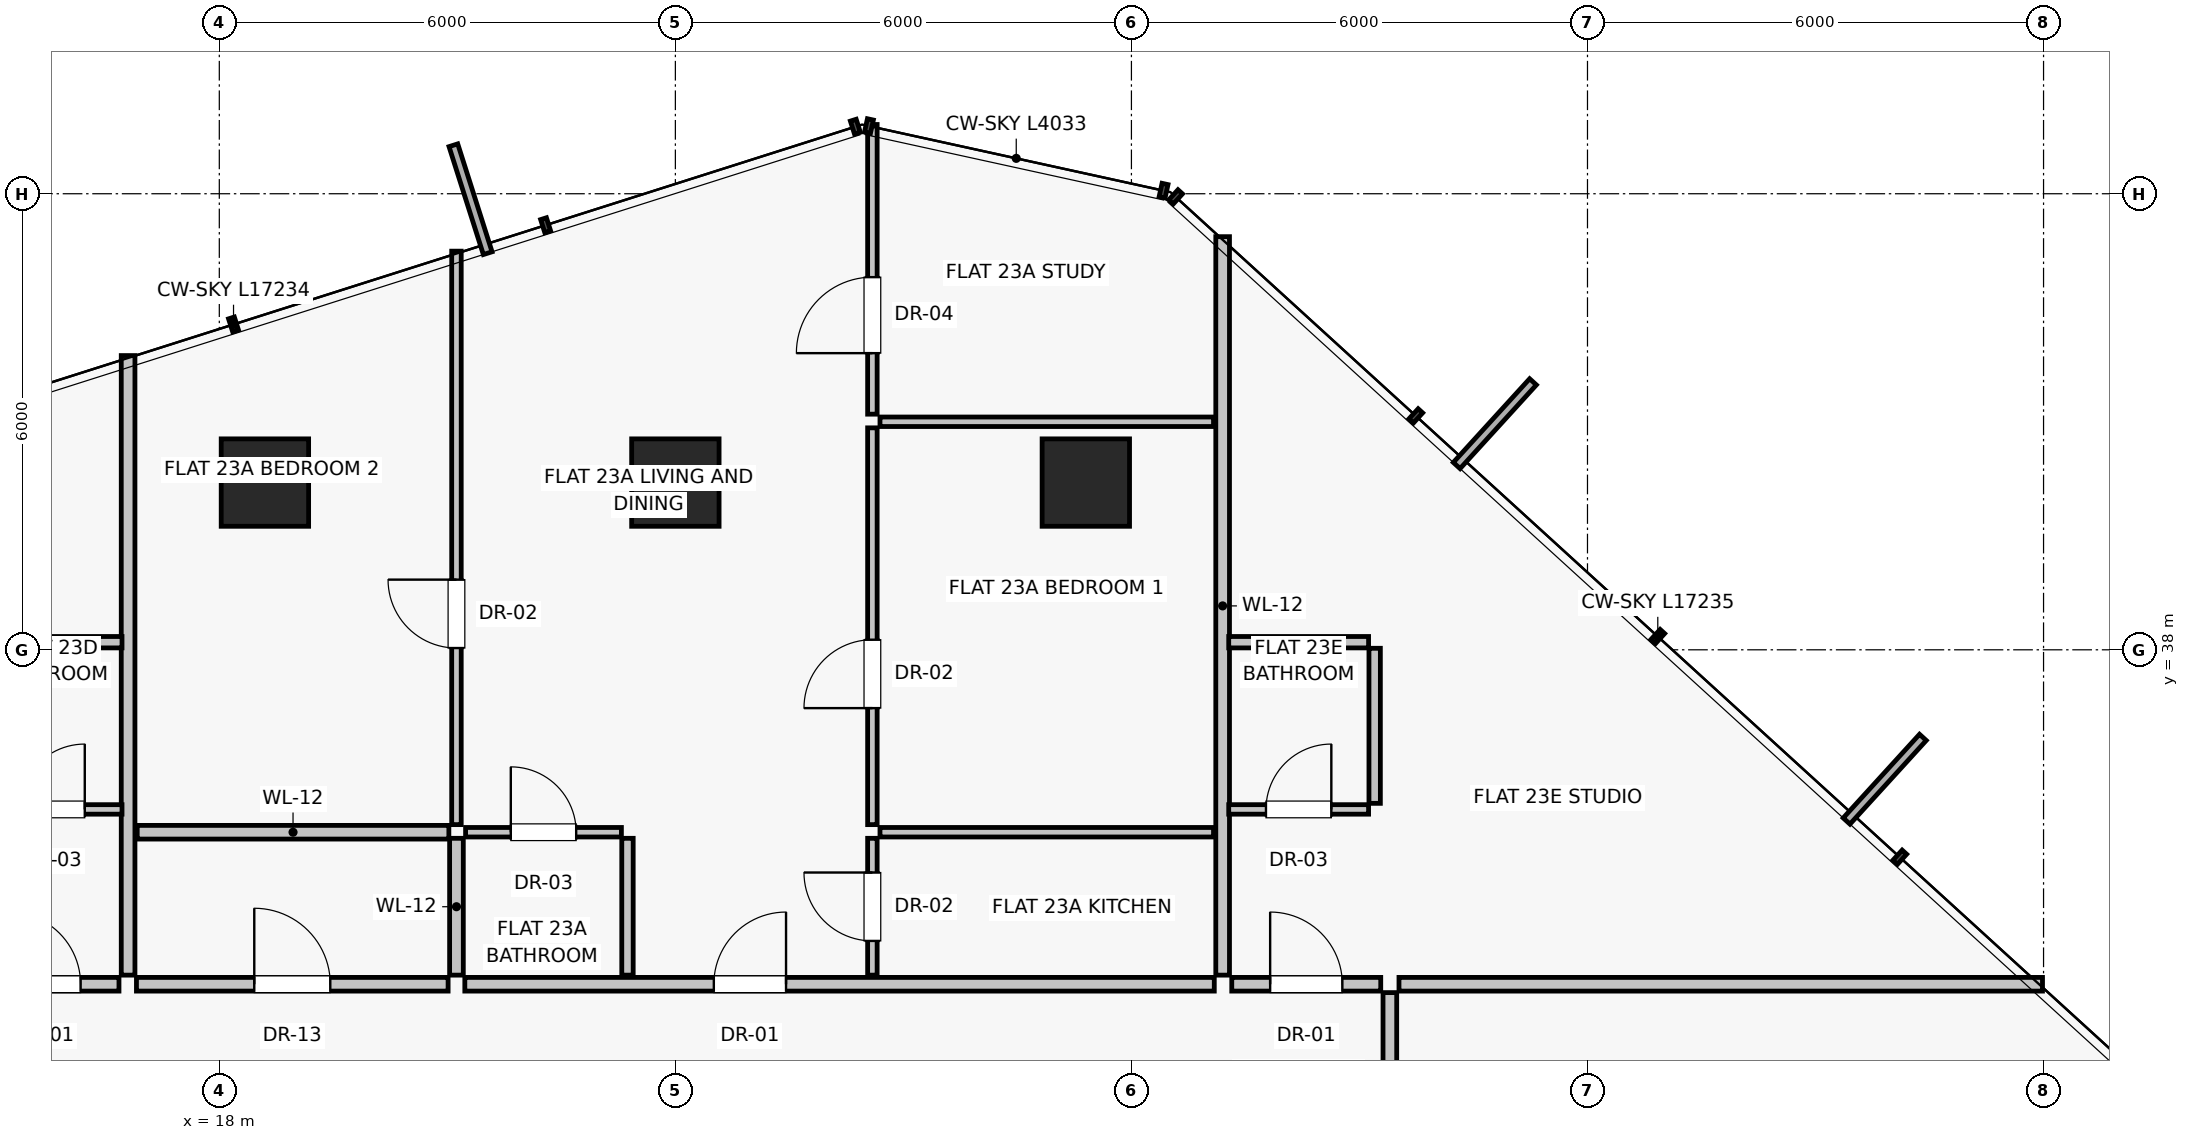
"""IFC4 building model, lengths in metres.
Left out: names, types, materials, properties, quantities, classifications, styles, units other than length and angle.
Written with IfcOpenShell. Run it as: python <this file> out.ifc"""

import sys

from ifc_helpers import new_model, si_unit, direction, frame, frame_2d, origin, origin_2d, place, context, subcontext, project, spatial, rectangle, extrude, source, transform, mapped, element, fill, save


model = new_model("IFC4")
c1 = context("Model", 3, precision=1e-05, world=origin(), true_north=direction((0.0, 1.0)))
c2 = subcontext(c1, "Body", "Model", "MODEL_VIEW")
j1 = project(units=[si_unit("LENGTHUNIT", "METRE"), si_unit("PLANEANGLEUNIT", "RADIAN")], contexts=[c1])
p1 = place(None, origin())
s1 = spatial("IfcSite", under=j1, at=p1, CompositionType="ELEMENT")
p2 = place(p1, origin())
s2 = spatial("IfcBuilding", under=s1, at=p2, CompositionType="ELEMENT")
p3 = place(p2, frame((0.0, 0.0, 85.15)))
s3 = spatial("IfcBuildingStorey", under=s2, at=p3, CompositionType="ELEMENT", Elevation=85.15)
for number, where, z_axis, x_axis in (
    (1, (29.4, 40.2, -0.32), (0.0, 0.0, 1.0), (1.0, 0.0, 0.0)),
    (2, (24.0, 40.2, -0.32), (0.0, 0.0, 1.0), (1.0, 0.0, 0.0)),
    (3, (18.6, 40.2, -0.32), (0.0, 0.0, 1.0), (1.0, 0.0, 0.0)),
):
    element("IfcColumn", number, at=place(p3, frame(where, z_axis=z_axis, x_axis=x_axis)), inside=s3, PredefinedType="COLUMN", context=c2, shape_type="SweptSolid", body=[
        extrude(rectangle(XDim=1.15, YDim=1.15, at=origin_2d()), origin(), (0.0, 0.0, 1.0), 4.62),
    ])
p4 = place(p3, frame((16.8, 33.72, 0.0), z_axis=(0.0, 0.0, 1.0), x_axis=(0.0, 1.0, 0.0)))
e4 = element("IfcWall", 4, at=p4, inside=s3, PredefinedType="PARTITIONING", context=c2, shape_type="SweptSolid", body=[
    extrude(rectangle(XDim=8.151, YDim=0.18, at=frame_2d((4.075, 0.0))), origin(), (0.0, 0.0, 1.0), 4.05),
])
p5 = place(p3, frame((31.2, 33.72, 0.0), z_axis=(0.0, 0.0, 1.0), x_axis=(0.0, 1.0, 0.0)))
e5 = element("IfcWall", 5, at=p5, inside=s3, PredefinedType="PARTITIONING", context=c2, shape_type="SweptSolid", body=[
    extrude(rectangle(XDim=9.715, YDim=0.18, at=frame_2d((4.858, 0.0))), origin(), (0.0, 0.0, 1.0), 4.05),
])
p6 = place(p3, frame((16.91, 33.6, 0.0), z_axis=(0.0, 0.0, 1.0), x_axis=(1.0, 0.0, 0.0)))
e6 = element("IfcWall", 6, at=p6, inside=s3, PredefinedType="PARTITIONING", context=c2, shape_type="SweptSolid", body=[
    extrude(rectangle(XDim=4.1, YDim=0.18, at=frame_2d((2.05, 0.0))), origin(), (0.0, 0.0, 1.0), 4.05),
])
p7 = place(p6, frame((1.55, 0.0, 0.0)))
e7 = element("IfcOpeningElement", 7, at=p7, cuts=e6, PredefinedType="OPENING", context=c2, shape_type="SweptSolid", body=[
    extrude(rectangle(XDim=1.0, YDim=2.01, at=frame_2d((0.5, 1.005))), frame((0.0, 0.1, 0.0), z_axis=(0.0, -1.0, 0.0), x_axis=(1.0, 0.0, 0.0)), (0.0, 0.0, 1.0), 0.2),
])
p8 = place(p3, frame((21.23, 33.6, 0.0), z_axis=(0.0, 0.0, 1.0), x_axis=(1.0, 0.0, 0.0)))
e8 = element("IfcWall", 8, at=p8, inside=s3, PredefinedType="PARTITIONING", context=c2, shape_type="SweptSolid", body=[
    extrude(rectangle(XDim=9.86, YDim=0.18, at=frame_2d((4.93, 0.0))), origin(), (0.0, 0.0, 1.0), 4.05),
])
p9 = place(p8, frame((3.276, 0.0, 0.0)))
e9 = element("IfcOpeningElement", 9, at=p9, cuts=e8, PredefinedType="OPENING", context=c2, shape_type="SweptSolid", body=[
    extrude(rectangle(XDim=0.95, YDim=2.02, at=frame_2d((0.475, 1.01))), frame((0.0, 0.1, 0.0), z_axis=(0.0, -1.0, 0.0), x_axis=(1.0, 0.0, 0.0)), (0.0, 0.0, 1.0), 0.2),
])
p10 = place(p3, frame((26.692, 41.0, 0.0), z_axis=(0.0, 0.0, 1.0), x_axis=(1.0, 0.0, 0.0)))
e10 = element("IfcWall", 10, at=p10, inside=s3, PredefinedType="PARTITIONING", context=c2, shape_type="SweptSolid", body=[
    extrude(rectangle(XDim=4.388, YDim=0.125, at=frame_2d((2.194, 0.0))), origin(), (0.0, 0.0, 1.0), 4.05),
])
p11 = place(p3, frame((26.592, 41.1, 0.0), z_axis=(0.0, 0.0, 1.0), x_axis=(0.0, 1.0, 0.0)))
e11 = element("IfcWall", 11, at=p11, inside=s3, PredefinedType="PARTITIONING", context=c2, shape_type="SweptSolid", body=[
    extrude(rectangle(XDim=3.811, YDim=0.125, at=frame_2d((1.905, 0.0))), origin(), (0.0, 0.0, 1.0), 4.05),
])
p12 = place(p11, frame((0.803, 0.0, 0.0)))
e12 = element("IfcOpeningElement", 12, at=p12, cuts=e11, PredefinedType="OPENING", context=c2, shape_type="SweptSolid", body=[
    extrude(rectangle(XDim=1.0, YDim=2.01, at=frame_2d((0.5, 1.005))), frame((0.0, 0.073, 0.0), z_axis=(0.0, -1.0, 0.0), x_axis=(1.0, 0.0, 0.0)), (0.0, 0.0, 1.0), 0.145),
])
p13 = place(p3, frame((16.92, 35.6, 0.0), z_axis=(0.0, 0.0, 1.0), x_axis=(1.0, 0.0, 0.0)))
e13 = element("IfcWall", 13, at=p13, inside=s3, PredefinedType="PARTITIONING", context=c2, shape_type="SweptSolid", body=[
    extrude(rectangle(XDim=4.1, YDim=0.18, at=frame_2d((2.05, 0.0))), origin(), (0.0, 0.0, 1.0), 3.63),
])
p14 = place(p3, frame((21.12, 33.72, 0.0), z_axis=(0.0, 0.0, 1.0), x_axis=(0.0, 1.0, 0.0)))
e14 = element("IfcWall", 14, at=p14, inside=s3, PredefinedType="PARTITIONING", context=c2, shape_type="SweptSolid", body=[
    extrude(rectangle(XDim=1.8, YDim=0.18, at=frame_2d((0.9, 0.0))), origin(), (0.0, 0.0, 1.0), 4.05),
])
p15 = place(p3, frame((21.12, 35.7, 0.0), z_axis=(0.0, 0.0, 1.0), x_axis=(0.0, 1.0, 0.0)))
e15 = element("IfcWall", 15, at=p15, inside=s3, PredefinedType="PARTITIONING", context=c2, shape_type="SweptSolid", body=[
    extrude(rectangle(XDim=7.545, YDim=0.125, at=frame_2d((3.772, 0.0))), origin(), (0.0, 0.0, 1.0), 4.05),
])
p16 = place(p15, frame((2.323, 0.0, 0.0)))
e16 = element("IfcOpeningElement", 16, at=p16, cuts=e15, PredefinedType="OPENING", context=c2, shape_type="SweptSolid", body=[
    extrude(rectangle(XDim=0.9, YDim=2.01, at=frame_2d((0.45, 1.005))), frame((0.0, 0.073, 0.0), z_axis=(0.0, -1.0, 0.0), x_axis=(1.0, 0.0, 0.0)), (0.0, 0.0, 1.0), 0.145),
])
p17 = place(p3, frame((23.37, 33.72, 0.0), z_axis=(0.0, 0.0, 1.0), x_axis=(0.0, 1.0, 0.0)))
e17 = element("IfcWall", 17, at=p17, inside=s3, PredefinedType="PARTITIONING", context=c2, shape_type="SweptSolid", body=[
    extrude(rectangle(XDim=1.8, YDim=0.15, at=frame_2d((0.9, 0.0))), origin(), (0.0, 0.0, 1.0), 4.05),
])
p18 = place(p3, frame((21.24, 35.6, 0.0), z_axis=(0.0, 0.0, 1.0), x_axis=(1.0, 0.0, 0.0)))
e18 = element("IfcWall", 18, at=p18, inside=s3, PredefinedType="PARTITIONING", context=c2, shape_type="SweptSolid", body=[
    extrude(rectangle(XDim=2.05, YDim=0.125, at=frame_2d((1.025, 0.0))), origin(), (0.0, 0.0, 1.0), 3.63),
])
p19 = place(p18, frame((0.595, 0.0, 0.0)))
e19 = element("IfcOpeningElement", 19, at=p19, cuts=e18, PredefinedType="OPENING", context=c2, shape_type="SweptSolid", body=[
    extrude(rectangle(XDim=0.86, YDim=2.01, at=frame_2d((0.43, 1.005))), frame((0.0, 0.073, 0.0), z_axis=(0.0, -1.0, 0.0), x_axis=(1.0, 0.0, 0.0)), (0.0, 0.0, 1.0), 0.145),
])
p20 = place(p3, frame((26.592, 33.72, 0.0), z_axis=(0.0, 0.0, 1.0), x_axis=(0.0, 1.0, 0.0)))
e20 = element("IfcWall", 20, at=p20, inside=s3, PredefinedType="PARTITIONING", context=c2, shape_type="SweptSolid", body=[
    extrude(rectangle(XDim=1.8, YDim=0.125, at=frame_2d((0.9, 0.0))), origin(), (0.0, 0.0, 1.0), 4.05),
])
p21 = place(p20, frame((0.45, 0.0, 0.0)))
e21 = element("IfcOpeningElement", 21, at=p21, cuts=e20, PredefinedType="OPENING", context=c2, shape_type="SweptSolid", body=[
    extrude(rectangle(XDim=0.9, YDim=2.01, at=frame_2d((0.45, 1.005))), frame((0.0, 0.073, 0.0), z_axis=(0.0, -1.0, 0.0), x_axis=(1.0, 0.0, 0.0)), (0.0, 0.0, 1.0), 0.145),
])
p22 = place(p3, frame((26.692, 35.6, 0.0), z_axis=(0.0, 0.0, 1.0), x_axis=(1.0, 0.0, 0.0)))
e22 = element("IfcWall", 22, at=p22, inside=s3, PredefinedType="PARTITIONING", context=c2, shape_type="SweptSolid", body=[
    extrude(rectangle(XDim=4.388, YDim=0.125, at=frame_2d((2.194, 0.0))), origin(), (0.0, 0.0, 1.0), 3.63),
])
p23 = place(p3, frame((26.592, 35.7, 0.0), z_axis=(0.0, 0.0, 1.0), x_axis=(0.0, 1.0, 0.0)))
e23 = element("IfcWall", 23, at=p23, inside=s3, PredefinedType="PARTITIONING", context=c2, shape_type="SweptSolid", body=[
    extrude(rectangle(XDim=5.22, YDim=0.125, at=frame_2d((2.61, 0.0))), origin(), (0.0, 0.0, 1.0), 4.05),
])
p24 = place(p23, frame((1.533, 0.0, 0.0)))
e24 = element("IfcOpeningElement", 24, at=p24, cuts=e23, PredefinedType="OPENING", context=c2, shape_type="SweptSolid", body=[
    extrude(rectangle(XDim=0.9, YDim=2.01, at=frame_2d((0.45, 1.005))), frame((0.0, 0.073, 0.0), z_axis=(0.0, -1.0, 0.0), x_axis=(1.0, 0.0, 0.0)), (0.0, 0.0, 1.0), 0.145),
])
p25 = place(p3, frame((33.52, 33.6, 0.0), z_axis=(0.0, 0.0, 1.0), x_axis=(1.0, 0.0, 0.0)))
e25 = element("IfcWall", 25, at=p25, inside=s3, PredefinedType="PARTITIONING", context=c2, shape_type="SweptSolid", body=[
    extrude(rectangle(XDim=8.466, YDim=0.18, at=frame_2d((4.233, 0.0))), origin(), (0.0, 0.0, 1.0), 4.05),
])
p26 = place(p3, frame((33.4, 24.11, 0.0), z_axis=(0.0, 0.0, 1.0), x_axis=(0.0, 1.0, 0.0)))
e26 = element("IfcWall", 26, at=p26, inside=s3, PredefinedType="PARTITIONING", context=c2, shape_type="SweptSolid", body=[
    extrude(rectangle(XDim=9.38, YDim=0.18, at=frame_2d((4.69, 0.0))), origin(), (0.0, 0.0, 1.0), 4.05),
])
p27 = place(p26, frame((4.19, 0.0, 0.0)))
e27 = element("IfcOpeningElement", 27, at=p27, cuts=e26, PredefinedType="OPENING", context=c2, shape_type="SweptSolid", body=[
    extrude(rectangle(XDim=1.0, YDim=2.01, at=frame_2d((0.5, 1.005))), frame((0.0, 0.1, 0.0), z_axis=(0.0, -1.0, 0.0), x_axis=(1.0, 0.0, 0.0)), (0.0, 0.0, 1.0), 0.2),
])
p28 = place(p3, frame((14.72, 33.6, 0.0), z_axis=(0.0, 0.0, 1.0), x_axis=(1.0, 0.0, 0.0)))
e28 = element("IfcWall", 28, at=p28, inside=s3, PredefinedType="PARTITIONING", context=c2, shape_type="SweptSolid", body=[
    extrude(rectangle(XDim=1.96, YDim=0.18, at=frame_2d((0.98, 0.0))), origin(), (0.0, 0.0, 1.0), 4.05),
])
p29 = place(p28, frame((0.505, 0.0, 0.0)))
e29 = element("IfcOpeningElement", 29, at=p29, cuts=e28, PredefinedType="OPENING", context=c2, shape_type="SweptSolid", body=[
    extrude(rectangle(XDim=0.95, YDim=2.02, at=frame_2d((0.475, 1.01))), frame((0.0, 0.1, 0.0), z_axis=(0.0, -1.0, 0.0), x_axis=(1.0, 0.0, 0.0)), (0.0, 0.0, 1.0), 0.2),
])
p30 = place(p3, frame((14.88, 35.9, 0.0), z_axis=(0.0, 0.0, 1.0), x_axis=(1.0, 0.0, 0.0)))
e30 = element("IfcWall", 30, at=p30, inside=s3, PredefinedType="PARTITIONING", context=c2, shape_type="SweptSolid", body=[
    extrude(rectangle(XDim=1.84, YDim=0.125, at=frame_2d((0.92, 0.0))), origin(), (0.0, 0.0, 1.0), 4.05),
])
p31 = place(p30, frame((0.49, 0.0, 0.0)))
e31 = element("IfcOpeningElement", 31, at=p31, cuts=e30, PredefinedType="OPENING", context=c2, shape_type="SweptSolid", body=[
    extrude(rectangle(XDim=0.86, YDim=2.01, at=frame_2d((0.43, 1.005))), frame((0.0, 0.073, 0.0), z_axis=(0.0, -1.0, 0.0), x_axis=(1.0, 0.0, 0.0)), (0.0, 0.0, 1.0), 0.145),
])
p32 = place(p3, frame((14.88, 38.1, 0.0), z_axis=(0.0, 0.0, 1.0), x_axis=(1.0, 0.0, 0.0)))
e32 = element("IfcWall", 32, at=p32, inside=s3, PredefinedType="PARTITIONING", context=c2, shape_type="SweptSolid", body=[
    extrude(rectangle(XDim=1.84, YDim=0.15, at=frame_2d((0.92, 0.0))), origin(), (0.0, 0.0, 1.0), 4.05),
])
p33 = place(p3, frame((31.32, 33.6, 0.0), z_axis=(0.0, 0.0, 1.0), x_axis=(1.0, 0.0, 0.0)))
e33 = element("IfcWall", 33, at=p33, inside=s3, PredefinedType="PARTITIONING", context=c2, shape_type="SweptSolid", body=[
    extrude(rectangle(XDim=1.96, YDim=0.18, at=frame_2d((0.98, 0.0))), origin(), (0.0, 0.0, 1.0), 4.05),
])
p34 = place(p33, frame((0.505, 0.0, 0.0)))
e34 = element("IfcOpeningElement", 34, at=p34, cuts=e33, PredefinedType="OPENING", context=c2, shape_type="SweptSolid", body=[
    extrude(rectangle(XDim=0.95, YDim=2.02, at=frame_2d((0.475, 1.01))), frame((0.0, 0.1, 0.0), z_axis=(0.0, -1.0, 0.0), x_axis=(1.0, 0.0, 0.0)), (0.0, 0.0, 1.0), 0.2),
])
p35 = place(p3, frame((31.28, 35.9, 0.0), z_axis=(0.0, 0.0, 1.0), x_axis=(1.0, 0.0, 0.0)))
e35 = element("IfcWall", 35, at=p35, inside=s3, PredefinedType="PARTITIONING", context=c2, shape_type="SweptSolid", body=[
    extrude(rectangle(XDim=1.84, YDim=0.125, at=frame_2d((0.92, 0.0))), origin(), (0.0, 0.0, 1.0), 4.05),
])
p36 = place(p35, frame((0.49, 0.0, 0.0)))
e36 = element("IfcOpeningElement", 36, at=p36, cuts=e35, PredefinedType="OPENING", context=c2, shape_type="SweptSolid", body=[
    extrude(rectangle(XDim=0.86, YDim=2.01, at=frame_2d((0.43, 1.005))), frame((0.0, 0.073, 0.0), z_axis=(0.0, -1.0, 0.0), x_axis=(1.0, 0.0, 0.0)), (0.0, 0.0, 1.0), 0.145),
])
p37 = place(p3, frame((31.28, 38.1, 0.0), z_axis=(0.0, 0.0, 1.0), x_axis=(1.0, 0.0, 0.0)))
e37 = element("IfcWall", 37, at=p37, inside=s3, PredefinedType="PARTITIONING", context=c2, shape_type="SweptSolid", body=[
    extrude(rectangle(XDim=1.84, YDim=0.15, at=frame_2d((0.92, 0.0))), origin(), (0.0, 0.0, 1.0), 4.05),
])
p38 = place(p3, frame((33.2, 35.98, 0.0), z_axis=(0.0, 0.0, 1.0), x_axis=(0.0, 1.0, 0.0)))
e38 = element("IfcWall", 38, at=p38, inside=s3, PredefinedType="PARTITIONING", context=c2, shape_type="SweptSolid", body=[
    extrude(rectangle(XDim=2.04, YDim=0.15, at=frame_2d((1.02, 0.0))), origin(), (0.0, 0.0, 1.0), 4.05),
])
m1 = source(origin(), c2, "Body", "SweptSolid", [
    extrude(rectangle(XDim=1.0, YDim=2.01, at=frame_2d((0.5, 1.005))), frame((0.0, 0.025, 0.0), z_axis=(0.0, -1.0, 0.0), x_axis=(1.0, 0.0, 0.0)), (0.0, 0.0, 1.0), 0.05),
])
p39 = place(p7, origin())
e39 = element("IfcDoor", 39, at=p39, inside=s3, OperationType="SINGLE_SWING_LEFT", PredefinedType="DOOR", context=c2, shape_type="MappedRepresentation", body=[
    mapped(m1, transform((0.0, 0.0, 0.0), scale=1.0)),
])
fill(e7, e39)
m2 = source(origin(), c2, "Body", "SweptSolid", [
    extrude(rectangle(XDim=0.95, YDim=2.02, at=frame_2d((0.475, 1.01))), frame((0.0, 0.025, 0.0), z_axis=(0.0, -1.0, 0.0), x_axis=(1.0, 0.0, 0.0)), (0.0, 0.0, 1.0), 0.05),
])
p40 = place(p9, origin())
e40 = element("IfcDoor", 40, at=p40, inside=s3, OperationType="SINGLE_SWING_RIGHT", PredefinedType="DOOR", context=c2, shape_type="MappedRepresentation", body=[
    mapped(m2, transform((0.0, 0.0, 0.0), scale=1.0)),
])
fill(e9, e40)
p41 = place(p12, origin())
e41 = element("IfcDoor", 41, at=p41, inside=s3, OperationType="SINGLE_SWING_LEFT", PredefinedType="DOOR", context=c2, shape_type="MappedRepresentation", body=[
    mapped(m1, transform((0.0, 0.0, 0.0), scale=1.0)),
])
fill(e12, e41)
m3 = source(origin(), c2, "Body", "SweptSolid", [
    extrude(rectangle(XDim=0.9, YDim=2.01, at=frame_2d((0.45, 1.005))), frame((0.0, 0.025, 0.0), z_axis=(0.0, -1.0, 0.0), x_axis=(1.0, 0.0, 0.0)), (0.0, 0.0, 1.0), 0.05),
])
p42 = place(p16, origin())
e42 = element("IfcDoor", 42, at=p42, inside=s3, OperationType="SINGLE_SWING_RIGHT", PredefinedType="DOOR", context=c2, shape_type="MappedRepresentation", body=[
    mapped(m3, transform((0.0, 0.0, 0.0), scale=1.0)),
])
fill(e16, e42)
m4 = source(origin(), c2, "Body", "SweptSolid", [
    extrude(rectangle(XDim=0.86, YDim=2.01, at=frame_2d((0.43, 1.005))), frame((0.0, 0.025, 0.0), z_axis=(0.0, -1.0, 0.0), x_axis=(1.0, 0.0, 0.0)), (0.0, 0.0, 1.0), 0.05),
])
p43 = place(p19, origin())
e43 = element("IfcDoor", 43, at=p43, inside=s3, OperationType="SINGLE_SWING_LEFT", PredefinedType="DOOR", context=c2, shape_type="MappedRepresentation", body=[
    mapped(m4, transform((0.0, 0.0, 0.0), scale=1.0)),
])
fill(e19, e43)
p44 = place(p21, origin())
e44 = element("IfcDoor", 44, at=p44, inside=s3, OperationType="SINGLE_SWING_RIGHT", PredefinedType="DOOR", context=c2, shape_type="MappedRepresentation", body=[
    mapped(m3, transform((0.0, 0.0, 0.0), scale=1.0)),
])
fill(e21, e44)
p45 = place(p24, origin())
e45 = element("IfcDoor", 45, at=p45, inside=s3, OperationType="SINGLE_SWING_LEFT", PredefinedType="DOOR", context=c2, shape_type="MappedRepresentation", body=[
    mapped(m3, transform((0.0, 0.0, 0.0), scale=1.0)),
])
fill(e24, e45)
p46 = place(p29, origin())
e46 = element("IfcDoor", 46, at=p46, inside=s3, OperationType="SINGLE_SWING_LEFT", PredefinedType="DOOR", context=c2, shape_type="MappedRepresentation", body=[
    mapped(m2, transform((0.0, 0.0, 0.0), scale=1.0)),
])
fill(e29, e46)
p47 = place(p31, origin())
e47 = element("IfcDoor", 47, at=p47, inside=s3, OperationType="SINGLE_SWING_RIGHT", PredefinedType="DOOR", context=c2, shape_type="MappedRepresentation", body=[
    mapped(m4, transform((0.0, 0.0, 0.0), scale=1.0)),
])
fill(e31, e47)
p48 = place(p34, origin())
e48 = element("IfcDoor", 48, at=p48, inside=s3, OperationType="SINGLE_SWING_LEFT", PredefinedType="DOOR", context=c2, shape_type="MappedRepresentation", body=[
    mapped(m2, transform((0.0, 0.0, 0.0), scale=1.0)),
])
fill(e34, e48)
p49 = place(p36, origin())
e49 = element("IfcDoor", 49, at=p49, inside=s3, OperationType="SINGLE_SWING_RIGHT", PredefinedType="DOOR", context=c2, shape_type="MappedRepresentation", body=[
    mapped(m4, transform((0.0, 0.0, 0.0), scale=1.0)),
])
fill(e36, e49)
save(model, sys.argv[1])
